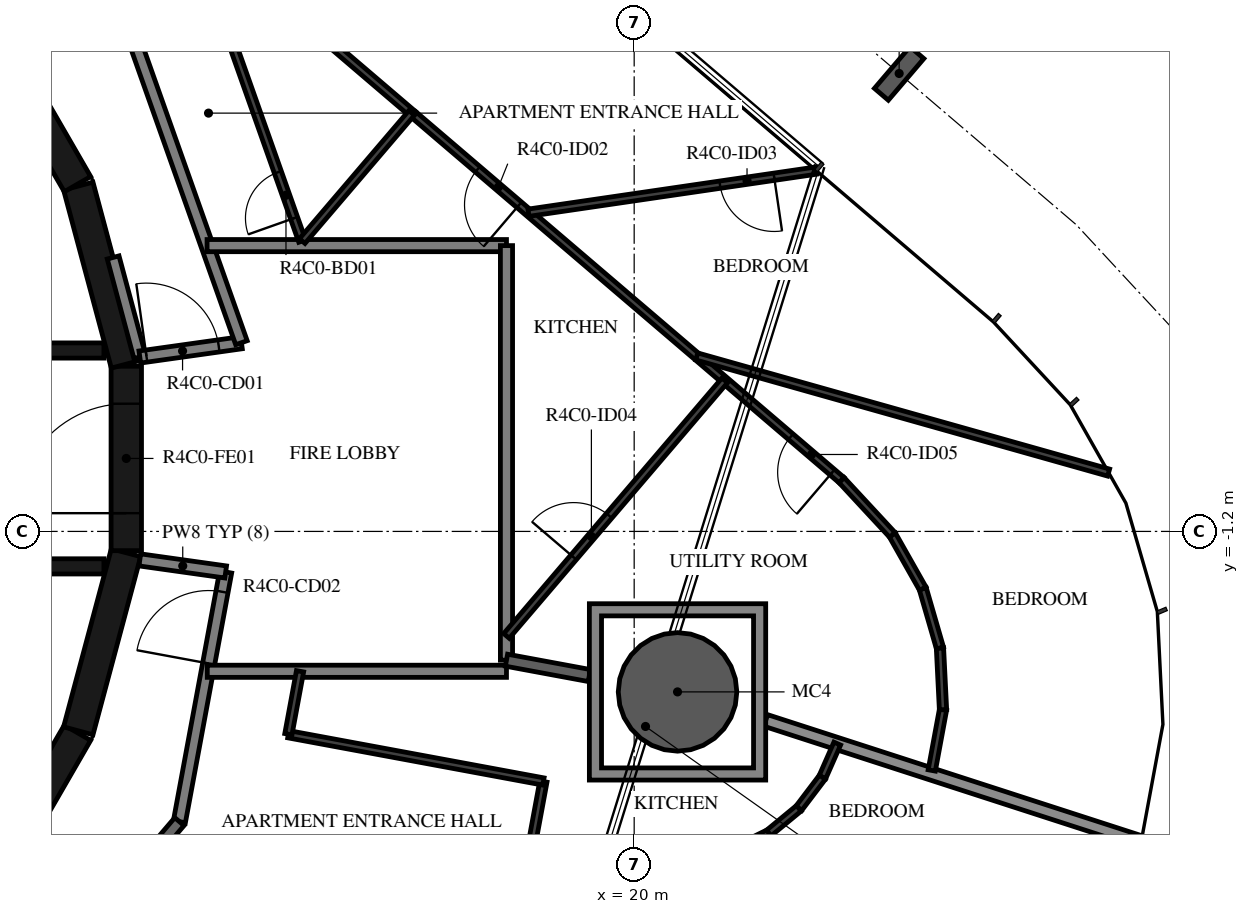
"""IFC4 building model, lengths in metres.
Left out: names, types, materials, properties, quantities, classifications, styles, units other than length and angle.
Written with IfcOpenShell. Run it as: python <this file> out.ifc"""

import sys

from ifc_helpers import new_model, si_unit, direction, frame, frame_2d, origin, origin_2d, place, context, subcontext, project, spatial, polyline, rectangle, hollow_circle, i_section, outline, extrude, element, fill, save


model = new_model("IFC4")
c1 = context("Model", 3, precision=1e-05, world=origin(), true_north=direction((0.0, 1.0)))
c2 = subcontext(c1, "Body", "Model", "MODEL_VIEW")
j1 = project(units=[si_unit("LENGTHUNIT", "METRE"), si_unit("PLANEANGLEUNIT", "RADIAN")], contexts=[c1])
p1 = place(None, origin())
s1 = spatial("IfcSite", under=j1, at=p1, CompositionType="ELEMENT")
p2 = place(p1, origin())
s2 = spatial("IfcBuilding", under=s1, at=p2, CompositionType="ELEMENT")
p3 = place(p2, frame((0.0, 0.0, 172.7)))
s3 = spatial("IfcBuildingStorey", under=s2, at=p3, CompositionType="ELEMENT", Elevation=172.7)
p4 = place(p3, frame((20.713, -3.839, -0.38), z_axis=(0.0, 0.0, 1.0), x_axis=(1.0, 0.0, 0.0)))
e1 = element("IfcColumn", 1, at=p4, inside=s3, PredefinedType="COLUMN", context=c2, shape_type="SweptSolid", body=[
    extrude(hollow_circle(Radius=0.975, WallThickness=0.045, at=origin_2d()), origin(), (0.0, 0.0, 1.0), 3.5),
])
p5 = place(p3, frame((24.358, 6.331, -0.38), z_axis=(0.0, 0.0, 1.0), x_axis=(0.76040600398, -0.649448003393, 0.0)))
e2 = element("IfcColumn", 2, at=p5, inside=s3, PredefinedType="COLUMN", context=c2, shape_type="SweptSolid", body=[
    extrude(i_section(OverallWidth=0.3, OverallDepth=0.9, WebThickness=0.019, FlangeThickness=0.035, FilletRadius=0.03, at=origin_2d()), origin(), (0.0, 0.0, 1.0), 3.5),
])
for number, where, z_axis, x_axis in (
    (3, (9.329, -7.137, 0.0), (0.0, 0.0, 1.0), (0.5, 0.866, 0.0)),
    (4, (10.858, -4.479, 0.0), (0.0, 0.0, 1.0), (0.259, 0.966, 0.0)),
):
    element("IfcWall", number, at=place(p3, frame(where, z_axis=z_axis, x_axis=x_axis)), inside=s3, PredefinedType="SHEAR", context=c2, shape_type="SweptSolid", body=[
        extrude(rectangle(XDim=3.033, YDim=0.5, at=frame_2d((1.516, 0.0))), origin(), (0.0, 0.0, 1.0), 3.12),
    ])
p6 = place(p3, frame((11.647, -1.516, 0.0), z_axis=(0.0, 0.0, 1.0), x_axis=(0.0, 1.0, 0.0)))
e5 = element("IfcWall", 5, at=p6, inside=s3, PredefinedType="SHEAR", context=c2, shape_type="SweptSolid", body=[
    extrude(rectangle(XDim=3.033, YDim=0.5, at=frame_2d((1.516, 0.0))), origin(), (0.0, 0.0, 1.0), 3.12),
])
p7 = place(p6, frame((0.616, 0.0, 0.0)))
e6 = element("IfcOpeningElement", 6, at=p7, cuts=e5, PredefinedType="OPENING", context=c2, shape_type="SweptSolid", body=[
    extrude(rectangle(XDim=1.8, YDim=2.1, at=frame_2d((0.9, 1.05))), frame((0.0, 0.26, 0.0), z_axis=(0.0, -1.0, 0.0), x_axis=(1.0, 0.0, 0.0)), (0.0, 0.0, 1.0), 0.52),
])
for number, where, z_axis, x_axis in (
    (7, (11.643, 1.55, 0.0), (0.0, 0.0, 1.0), (-0.259, 0.966, 0.0)),
    (8, (10.845, 4.51, 0.0), (0.0, 0.0, 1.0), (-0.5, 0.866, 0.0)),
):
    element("IfcWall", number, at=place(p3, frame(where, z_axis=z_axis, x_axis=x_axis)), inside=s3, PredefinedType="SHEAR", context=c2, shape_type="SweptSolid", body=[
        extrude(rectangle(XDim=3.033, YDim=0.5, at=frame_2d((1.516, 0.0))), origin(), (0.0, 0.0, 1.0), 3.12),
    ])
p8 = place(p3, frame((3.35, 1.775, 0.0), z_axis=(0.0, 0.0, 1.0), x_axis=(1.0, 0.0, 0.0)))
e9 = element("IfcWall", 9, at=p8, inside=s3, PredefinedType="SHEAR", context=c2, shape_type="SweptSolid", body=[
    extrude(rectangle(XDim=7.93, YDim=0.25, at=frame_2d((3.965, 0.0))), origin(), (0.0, 0.0, 1.0), 3.12),
])
p9 = place(p8, frame((0.35, 0.0, 0.0)))
e10 = element("IfcOpeningElement", 10, at=p9, cuts=e9, PredefinedType="OPENING", context=c2, shape_type="SweptSolid", body=[
    extrude(rectangle(XDim=1.2, YDim=2.4, at=frame_2d((0.6, 1.2))), frame((0.0, 0.135, 0.0), z_axis=(0.0, -1.0, 0.0), x_axis=(1.0, 0.0, 0.0)), (0.0, 0.0, 1.0), 0.27),
])
p10 = place(p8, frame((2.5, 0.0, 0.0)))
e11 = element("IfcOpeningElement", 11, at=p10, cuts=e9, PredefinedType="OPENING", context=c2, shape_type="SweptSolid", body=[
    extrude(rectangle(XDim=1.2, YDim=2.4, at=frame_2d((0.6, 1.2))), frame((0.0, 0.135, 0.0), z_axis=(0.0, -1.0, 0.0), x_axis=(1.0, 0.0, 0.0)), (0.0, 0.0, 1.0), 0.27),
])
p11 = place(p8, frame((4.8, 0.0, 0.0)))
e12 = element("IfcOpeningElement", 12, at=p11, cuts=e9, PredefinedType="OPENING", context=c2, shape_type="SweptSolid", body=[
    extrude(rectangle(XDim=0.9, YDim=2.1, at=frame_2d((0.45, 1.05))), frame((0.0, 0.135, 0.0), z_axis=(0.0, -1.0, 0.0), x_axis=(1.0, 0.0, 0.0)), (0.0, 0.0, 1.0), 0.27),
])
p12 = place(p3, frame((3.35, -1.775, 0.0), z_axis=(0.0, 0.0, 1.0), x_axis=(1.0, 0.0, 0.0)))
e13 = element("IfcWall", 13, at=p12, inside=s3, PredefinedType="SHEAR", context=c2, shape_type="SweptSolid", body=[
    extrude(rectangle(XDim=7.93, YDim=0.25, at=frame_2d((3.965, 0.0))), origin(), (0.0, 0.0, 1.0), 3.12),
])
p13 = place(p12, frame((0.4, 0.0, 0.0)))
e14 = element("IfcOpeningElement", 14, at=p13, cuts=e13, PredefinedType="OPENING", context=c2, shape_type="SweptSolid", body=[
    extrude(rectangle(XDim=1.1, YDim=2.4, at=frame_2d((0.55, 1.2))), frame((0.0, 0.135, 0.0), z_axis=(0.0, -1.0, 0.0), x_axis=(1.0, 0.0, 0.0)), (0.0, 0.0, 1.0), 0.27),
])
p14 = place(p12, frame((2.55, 0.0, 0.0)))
e15 = element("IfcOpeningElement", 15, at=p14, cuts=e13, PredefinedType="OPENING", context=c2, shape_type="SweptSolid", body=[
    extrude(rectangle(XDim=1.1, YDim=2.4, at=frame_2d((0.55, 1.2))), frame((0.0, 0.135, 0.0), z_axis=(0.0, -1.0, 0.0), x_axis=(1.0, 0.0, 0.0)), (0.0, 0.0, 1.0), 0.27),
])
p15 = place(p12, frame((4.7, 0.0, 0.0)))
e16 = element("IfcOpeningElement", 16, at=p15, cuts=e13, PredefinedType="OPENING", context=c2, shape_type="SweptSolid", body=[
    extrude(rectangle(XDim=1.1, YDim=2.4, at=frame_2d((0.55, 1.2))), frame((0.0, 0.135, 0.0), z_axis=(0.0, -1.0, 0.0), x_axis=(1.0, 0.0, 0.0)), (0.0, 0.0, 1.0), 0.27),
])
p16 = place(p3, frame((11.87, 1.668, 0.0), z_axis=(0.0, 0.0, 1.0), x_axis=(-0.258836880648, 0.965921047093, 0.0)))
e17 = element("IfcWall", 17, at=p16, inside=s3, PredefinedType="STANDARD", context=c2, shape_type="SweptSolid", body=[
    extrude(rectangle(XDim=1.695, YDim=0.2, at=frame_2d((0.848, 0.0))), origin(), (0.0, 0.0, 1.0), 3.12),
])
p17 = place(p3, frame((11.87, 1.668, 0.0), z_axis=(0.0, 0.0, 1.0), x_axis=(0.990270910415, 0.139152879904, 0.0)))
e18 = element("IfcWall", 18, at=p17, inside=s3, PredefinedType="STANDARD", context=c2, shape_type="SweptSolid", body=[
    extrude(rectangle(XDim=1.688, YDim=0.2, at=frame_2d((0.844, 0.0))), origin(), (0.0, 0.0, 1.0), 3.12),
])
p18 = place(p17, frame((0.11, 0.0, 0.0)))
e19 = element("IfcOpeningElement", 19, at=p18, cuts=e18, PredefinedType="OPENING", context=c2, shape_type="SweptSolid", body=[
    extrude(rectangle(XDim=1.2, YDim=2.1, at=frame_2d((0.6, 1.05))), frame((0.0, 0.11, 0.0), z_axis=(0.0, -1.0, 0.0), x_axis=(1.0, 0.0, 0.0)), (0.0, 0.0, 1.0), 0.22),
])
p19 = place(p3, frame((13.542, 1.903, 0.0), z_axis=(0.0, 0.0, 1.0), x_axis=(-0.333808508206, 0.942640907159, 0.0)))
e20 = element("IfcWall", 20, at=p19, inside=s3, PredefinedType="STANDARD", context=c2, shape_type="SweptSolid", body=[
    extrude(rectangle(XDim=6.317, YDim=0.2, at=frame_2d((3.158, 0.0))), origin(), (0.0, 0.0, 1.0), 3.12),
])
p20 = place(p3, frame((12.521, -5.972, 0.0), z_axis=(0.0, 0.0, 1.0), x_axis=(0.182244189886, 0.983253301674, 0.0)))
e21 = element("IfcWall", 21, at=p20, inside=s3, PredefinedType="STANDARD", context=c2, shape_type="SweptSolid", body=[
    extrude(rectangle(XDim=4.176, YDim=0.2, at=frame_2d((2.088, 0.0))), origin(), (0.0, 0.0, 1.0), 3.12),
])
p21 = place(p20, frame((2.645, 0.0, 0.0)))
e22 = element("IfcOpeningElement", 22, at=p21, cuts=e21, PredefinedType="OPENING", context=c2, shape_type="SweptSolid", body=[
    extrude(rectangle(XDim=1.2, YDim=2.1, at=frame_2d((0.6, 1.05))), frame((0.0, 0.11, 0.0), z_axis=(0.0, -1.0, 0.0), x_axis=(1.0, 0.0, 0.0)), (0.0, 0.0, 1.0), 0.22),
])
p22 = place(p3, frame((13.282, -1.867, 0.0), z_axis=(0.0, 0.0, 1.0), x_axis=(-0.990265430288, 0.139191873241, 0.0)))
e23 = element("IfcWall", 23, at=p22, inside=s3, PredefinedType="STANDARD", context=c2, shape_type="SweptSolid", body=[
    extrude(rectangle(XDim=1.426, YDim=0.2, at=frame_2d((0.713, 0.0))), origin(), (0.0, 0.0, 1.0), 3.12),
])
p23 = place(p3, frame((7.858, -11.433, 0.0), z_axis=(0.0, 0.0, 1.0), x_axis=(0.649440801937, 0.760412154545, 0.0)))
e24 = element("IfcWall", 24, at=p23, inside=s3, PredefinedType="STANDARD", context=c2, shape_type="SweptSolid", body=[
    extrude(rectangle(XDim=7.181, YDim=0.2, at=frame_2d((3.59, 0.0))), origin(), (0.0, 0.0, 1.0), 3.12),
])
p24 = place(p3, frame((17.9, 3.5, 0.0), z_axis=(0.0, 0.0, 1.0), x_axis=(-1.0, 0.0, 0.0)))
e25 = element("IfcWall", 25, at=p24, inside=s3, PredefinedType="STANDARD", context=c2, shape_type="SweptSolid", body=[
    extrude(rectangle(XDim=4.924, YDim=0.2, at=frame_2d((2.462, 0.0))), origin(), (0.0, 0.0, 1.0), 3.12),
])
p25 = place(p3, frame((17.9, -3.318, 0.0), z_axis=(0.0, 0.0, 1.0), x_axis=(0.0, 1.0, 0.0)))
e26 = element("IfcWall", 26, at=p25, inside=s3, PredefinedType="STANDARD", context=c2, shape_type="SweptSolid", body=[
    extrude(rectangle(XDim=6.818, YDim=0.2, at=frame_2d((3.409, 0.0))), origin(), (0.0, 0.0, 1.0), 3.12),
])
p26 = place(p3, frame((12.979, -3.5, 0.0), z_axis=(0.0, 0.0, 1.0), x_axis=(1.0, 0.0, 0.0)))
e27 = element("IfcWall", 27, at=p26, inside=s3, PredefinedType="STANDARD", context=c2, shape_type="SweptSolid", body=[
    extrude(rectangle(XDim=4.92, YDim=0.2, at=frame_2d((2.46, 0.0))), origin(), (0.0, 0.0, 1.0), 3.12),
])
p27 = place(p3, frame((22.163, -4.308, 0.0), z_axis=(0.0, 0.0, 1.0), x_axis=(0.951422718769, -0.307887658426, 0.0)))
e28 = element("IfcWall", 28, at=p27, inside=s3, PredefinedType="STANDARD", context=c2, shape_type="SweptSolid", body=[
    extrude(rectangle(XDim=6.464, YDim=0.2, at=frame_2d((3.232, 0.0))), origin(), (0.0, 0.0, 1.0), 2.73),
])
p28 = place(p3, frame((17.9, -3.318, 0.0), z_axis=(0.0, 0.0, 1.0), x_axis=(0.983252800712, -0.182246892682, 0.0)))
e29 = element("IfcWall", 29, at=p28, inside=s3, PredefinedType="STANDARD", context=c2, shape_type="SweptSolid", body=[
    extrude(rectangle(XDim=1.386, YDim=0.2, at=frame_2d((0.693, 0.0))), origin(), (0.0, 0.0, 1.0), 3.12),
])
p29 = place(p3, frame((14.541, 3.575, 0.0), z_axis=(0.0, 0.0, 1.0), x_axis=(-0.333799280318, 0.942644174893, 0.0)))
e30 = element("IfcWall", 30, at=p29, inside=s3, PredefinedType="PARTITIONING", context=c2, shape_type="SweptSolid", body=[
    extrude(rectangle(XDim=5.477, YDim=0.12, at=frame_2d((2.738, 0.0))), origin(), (0.0, 0.0, 1.0), 3.12),
])
p30 = place(p29, frame((0.4, 0.0, 0.0)))
e31 = element("IfcOpeningElement", 31, at=p30, cuts=e30, PredefinedType="OPENING", context=c2, shape_type="SweptSolid", body=[
    extrude(rectangle(XDim=0.8, YDim=2.1, at=frame_2d((0.4, 1.05))), frame((0.0, 0.07, 0.0), z_axis=(0.0, -1.0, 0.0), x_axis=(1.0, 0.0, 0.0)), (0.0, 0.0, 1.0), 0.14),
])
p31 = place(p3, frame((12.734, 8.762, 0.0), z_axis=(0.0, 0.0, 1.0), x_axis=(0.760390484255, -0.649466174219, 0.0)))
e32 = element("IfcWall", 32, at=p31, inside=s3, PredefinedType="PARTITIONING", context=c2, shape_type="SweptSolid", body=[
    extrude(rectangle(XDim=4.783, YDim=0.12, at=frame_2d((2.391, 0.0))), origin(), (0.0, 0.0, 1.0), 3.12),
])
p32 = place(p3, frame((23.411, -0.357, 0.0), z_axis=(0.0, 0.0, 1.0), x_axis=(-0.76041871148, 0.649433124525, 0.0)))
e33 = element("IfcWall", 33, at=p32, inside=s3, PredefinedType="PARTITIONING", context=c2, shape_type="SweptSolid", body=[
    extrude(rectangle(XDim=9.259, YDim=0.12, at=frame_2d((4.629, 0.0))), origin(), (0.0, 0.0, 1.0), 3.12),
])
p33 = place(p32, frame((6.972, 0.0, 0.0)))
e34 = element("IfcOpeningElement", 34, at=p33, cuts=e33, PredefinedType="OPENING", context=c2, shape_type="SweptSolid", body=[
    extrude(rectangle(XDim=0.9, YDim=2.1, at=frame_2d((0.45, 1.05))), frame((0.0, 0.07, 0.0), z_axis=(0.0, -1.0, 0.0), x_axis=(1.0, 0.0, 0.0)), (0.0, 0.0, 1.0), 0.14),
])
p34 = place(p32, frame((0.2, 0.0, 0.0)))
e35 = element("IfcOpeningElement", 35, at=p34, cuts=e33, PredefinedType="OPENING", context=c2, shape_type="SweptSolid", body=[
    extrude(rectangle(XDim=0.9, YDim=2.1, at=frame_2d((0.45, 1.05))), frame((0.0, 0.07, 0.0), z_axis=(0.0, -1.0, 0.0), x_axis=(1.0, 0.0, 0.0)), (0.0, 0.0, 1.0), 0.14),
])
p35 = place(p3, frame((16.341, 5.682, 0.0), z_axis=(0.0, 0.0, 1.0), x_axis=(-0.64946993237, -0.76038727432, 0.0)))
e36 = element("IfcWall", 36, at=p35, inside=s3, PredefinedType="PARTITIONING", context=c2, shape_type="SweptSolid", body=[
    extrude(rectangle(XDim=2.771, YDim=0.12, at=frame_2d((1.386, 0.0))), origin(), (0.0, 0.0, 1.0), 3.12),
])
p36 = place(p3, frame((17.9, -2.918, 0.0), z_axis=(0.0, 0.0, 1.0), x_axis=(0.649469887983, 0.760387312232, 0.0)))
e37 = element("IfcWall", 37, at=p36, inside=s3, PredefinedType="PARTITIONING", context=c2, shape_type="SweptSolid", body=[
    extrude(rectangle(XDim=5.527, YDim=0.12, at=frame_2d((2.763, 0.0))), origin(), (0.0, 0.0, 1.0), 3.12),
])
p37 = place(p36, frame((1.7, 0.0, 0.0)))
e38 = element("IfcOpeningElement", 38, at=p37, cuts=e37, PredefinedType="OPENING", context=c2, shape_type="SweptSolid", body=[
    extrude(rectangle(XDim=0.9, YDim=2.1, at=frame_2d((0.45, 1.05))), frame((0.0, 0.07, 0.0), z_axis=(0.0, -1.0, 0.0), x_axis=(1.0, 0.0, 0.0)), (0.0, 0.0, 1.0), 0.14),
])
p38 = place(p3, frame((22.994, 4.734, 0.0), z_axis=(0.0, 0.0, 1.0), x_axis=(-0.989449286977, -0.144879634529, 0.0)))
e39 = element("IfcWall", 39, at=p38, inside=s3, PredefinedType="PARTITIONING", context=c2, shape_type="SweptSolid", body=[
    extrude(rectangle(XDim=4.782, YDim=0.12, at=frame_2d((2.391, 0.0))), origin(), (0.0, 0.0, 1.0), 3.12),
])
p39 = place(p38, frame((0.7, 0.0, 0.0)))
e40 = element("IfcOpeningElement", 40, at=p39, cuts=e39, PredefinedType="OPENING", context=c2, shape_type="SweptSolid", body=[
    extrude(rectangle(XDim=0.9, YDim=2.1, at=frame_2d((0.45, 1.05))), frame((0.0, 0.07, 0.0), z_axis=(0.0, -1.0, 0.0), x_axis=(1.0, 0.0, 0.0)), (0.0, 0.0, 1.0), 0.14),
])
p40 = place(p3, frame((21.029, 1.677, 0.0), z_axis=(0.0, 0.0, 1.0), x_axis=(0.962458274539, -0.271429677396, 0.0)))
e41 = element("IfcWall", 41, at=p40, inside=s3, PredefinedType="PARTITIONING", context=c2, shape_type="SweptSolid", body=[
    extrude(rectangle(XDim=7.037, YDim=0.12, at=frame_2d((3.519, 0.0))), origin(), (0.0, 0.0, 1.0), 3.12),
])
for number, where, z_axis, x_axis in (
    (42, (24.894, -5.131, 0.0), (0.0, 0.0, 1.0), (0.182, 0.983, 0.0)),
    (43, (25.079, -4.132, 0.0), (0.0, 0.0, 1.0), (-0.049, 0.999, 0.0)),
):
    element("IfcWall", number, at=place(p3, frame(where, z_axis=z_axis, x_axis=x_axis)), inside=s3, PredefinedType="PARTITIONING", context=c2, shape_type="SweptSolid", body=[
        extrude(rectangle(XDim=1.016, YDim=0.12, at=frame_2d((0.508, 0.0))), origin(), (0.0, 0.0, 1.0), 3.12),
    ])
for number, where, z_axis, x_axis in (
    (44, (25.029, -3.117, 0.0), (0.0, 0.0, 1.0), (-0.279, 0.96, 0.0)),
    (45, (24.746, -2.141, 0.0), (0.0, 0.0, 1.0), (-0.492, 0.87, 0.0)),
):
    element("IfcWall", number, at=place(p3, frame(where, z_axis=z_axis, x_axis=x_axis)), inside=s3, PredefinedType="PARTITIONING", context=c2, shape_type="SweptSolid", body=[
        extrude(rectangle(XDim=1.016, YDim=0.12, at=frame_2d((0.508, 0.0))), origin(), (0.0, 0.0, 1.0), 3.12),
    ])
p41 = place(p3, frame((24.246, -1.257, 0.0), z_axis=(0.0, 0.0, 1.0), x_axis=(-0.679840361176, 0.733360132074, 0.0)))
e46 = element("IfcWall", 46, at=p41, inside=s3, PredefinedType="PARTITIONING", context=c2, shape_type="SweptSolid", body=[
    extrude(rectangle(XDim=1.227, YDim=0.12, at=frame_2d((0.614, 0.0))), origin(), (0.0, 0.0, 1.0), 3.12),
])
p42 = place(p3, frame((18.055, -7.75, 0.0), z_axis=(0.0, 0.0, 1.0), x_axis=(0.18225497314, 0.983251302957, 0.0)))
e47 = element("IfcWall", 47, at=p42, inside=s3, PredefinedType="PARTITIONING", context=c2, shape_type="SweptSolid", body=[
    extrude(rectangle(XDim=2.479, YDim=0.12, at=frame_2d((1.24, 0.0))), origin(), (0.0, 0.0, 1.0), 3.12),
])
p43 = place(p42, frame((0.4, 0.0, 0.0)))
e48 = element("IfcOpeningElement", 48, at=p43, cuts=e47, PredefinedType="OPENING", context=c2, shape_type="SweptSolid", body=[
    extrude(rectangle(XDim=0.9, YDim=2.1, at=frame_2d((0.45, 1.05))), frame((0.0, 0.07, 0.0), z_axis=(0.0, -1.0, 0.0), x_axis=(1.0, 0.0, 0.0)), (0.0, 0.0, 1.0), 0.14),
])
p44 = place(p3, frame((18.507, -5.312, 0.0), z_axis=(0.0, 0.0, 1.0), x_axis=(-0.983254286603, 0.182238875868, 0.0)))
e49 = element("IfcWall", 49, at=p44, inside=s3, PredefinedType="PARTITIONING", context=c2, shape_type="SweptSolid", body=[
    extrude(rectangle(XDim=4.266, YDim=0.12, at=frame_2d((2.133, 0.0))), origin(), (0.0, 0.0, 1.0), 3.12),
])
p45 = place(p3, frame((14.313, -4.535, 0.0), z_axis=(0.0, 0.0, 1.0), x_axis=(0.182271946033, 0.983248156718, 0.0)))
e50 = element("IfcWall", 50, at=p45, inside=s3, PredefinedType="PARTITIONING", context=c2, shape_type="SweptSolid", body=[
    extrude(rectangle(XDim=1.053, YDim=0.12, at=frame_2d((0.526, 0.0))), origin(), (0.0, 0.0, 1.0), 3.12),
])
p46 = place(p3, frame((23.34, -4.689, 0.0), z_axis=(0.0, 0.0, 1.0), x_axis=(-0.404077449371, -0.914724775498, 0.0)))
e51 = element("IfcWall", 51, at=p46, inside=s3, PredefinedType="PARTITIONING", context=c2, shape_type="SweptSolid", body=[
    extrude(rectangle(XDim=0.605, YDim=0.12, at=frame_2d((0.302, 0.0))), origin(), (0.0, 0.0, 1.0), 3.12),
])
for number, where, z_axis, x_axis in (
    (52, (23.095, -5.242, 0.0), (0.0, 0.0, 1.0), (-0.604, -0.797, 0.0)),
    (53, (22.708, -5.754, 0.0), (0.0, 0.0, 1.0), (-0.772, -0.636, 0.0)),
):
    element("IfcWall", number, at=place(p3, frame(where, z_axis=z_axis, x_axis=x_axis)), inside=s3, PredefinedType="PARTITIONING", context=c2, shape_type="SweptSolid", body=[
        extrude(rectangle(XDim=0.642, YDim=0.12, at=frame_2d((0.321, 0.0))), origin(), (0.0, 0.0, 1.0), 3.12),
    ])
p47 = place(p3, frame((22.212, -6.162, 0.0), z_axis=(0.0, 0.0, 1.0), x_axis=(-0.897448694974, -0.441118850072, 0.0)))
e54 = element("IfcWall", 54, at=p47, inside=s3, PredefinedType="PARTITIONING", context=c2, shape_type="SweptSolid", body=[
    extrude(rectangle(XDim=0.947, YDim=0.12, at=frame_2d((0.474, 0.0))), origin(), (0.0, 0.0, 1.0), 3.12),
])
p48 = place(p3, origin())
e55 = element("IfcWall", 55, at=p48, inside=s3, PredefinedType="STANDARD", context=c2, shape_type="SweptSolid", body=[
    extrude(outline(polyline([(22.163, -2.389), (22.163, -5.289), (19.263, -5.289), (19.263, -2.389), (22.163, -2.389)]), holes=[polyline([(19.463, -5.089), (21.963, -5.089), (21.963, -2.589), (19.463, -2.589), (19.463, -5.089)])]), origin(), (0.0, 0.0, 1.0), 3.12),
])
p49 = place(p7, origin())
e56 = element("IfcDoor", 56, at=p49, inside=s3, OperationType="DOUBLE_DOOR_SINGLE_SWING", PredefinedType="DOOR", context=c2, shape_type="SweptSolid", body=[
    extrude(rectangle(XDim=1.8, YDim=2.1, at=frame_2d((0.9, 1.05))), frame((0.0, 0.025, 0.0), z_axis=(0.0, -1.0, 0.0), x_axis=(1.0, 0.0, 0.0)), (0.0, 0.0, 1.0), 0.05),
])
fill(e6, e56)
p50 = place(p30, origin())
e57 = element("IfcDoor", 57, at=p50, inside=s3, OperationType="SINGLE_SWING_LEFT", PredefinedType="DOOR", context=c2, shape_type="SweptSolid", body=[
    extrude(rectangle(XDim=0.8, YDim=2.1, at=frame_2d((0.4, 1.05))), frame((0.0, 0.025, 0.0), z_axis=(0.0, -1.0, 0.0), x_axis=(1.0, 0.0, 0.0)), (0.0, 0.0, 1.0), 0.05),
])
fill(e31, e57)
p51 = place(p33, origin())
e58 = element("IfcDoor", 58, at=p51, inside=s3, OperationType="SINGLE_SWING_RIGHT", PredefinedType="DOOR", context=c2, shape_type="SweptSolid", body=[
    extrude(rectangle(XDim=0.9, YDim=2.1, at=frame_2d((0.45, 1.05))), frame((0.0, 0.025, 0.0), z_axis=(0.0, -1.0, 0.0), x_axis=(1.0, 0.0, 0.0)), (0.0, 0.0, 1.0), 0.05),
])
fill(e34, e58)
p52 = place(p39, origin())
e59 = element("IfcDoor", 59, at=p52, inside=s3, OperationType="SINGLE_SWING_LEFT", PredefinedType="DOOR", context=c2, shape_type="SweptSolid", body=[
    extrude(rectangle(XDim=0.9, YDim=2.1, at=frame_2d((0.45, 1.05))), frame((0.0, 0.025, 0.0), z_axis=(0.0, -1.0, 0.0), x_axis=(1.0, 0.0, 0.0)), (0.0, 0.0, 1.0), 0.05),
])
fill(e40, e59)
p53 = place(p37, origin())
e60 = element("IfcDoor", 60, at=p53, inside=s3, OperationType="SINGLE_SWING_LEFT", PredefinedType="DOOR", context=c2, shape_type="SweptSolid", body=[
    extrude(rectangle(XDim=0.9, YDim=2.1, at=frame_2d((0.45, 1.05))), frame((0.0, 0.025, 0.0), z_axis=(0.0, -1.0, 0.0), x_axis=(1.0, 0.0, 0.0)), (0.0, 0.0, 1.0), 0.05),
])
fill(e38, e60)
p54 = place(p34, origin())
e61 = element("IfcDoor", 61, at=p54, inside=s3, OperationType="SINGLE_SWING_LEFT", PredefinedType="DOOR", context=c2, shape_type="SweptSolid", body=[
    extrude(rectangle(XDim=0.9, YDim=2.1, at=frame_2d((0.45, 1.05))), frame((0.0, 0.025, 0.0), z_axis=(0.0, -1.0, 0.0), x_axis=(1.0, 0.0, 0.0)), (0.0, 0.0, 1.0), 0.05),
])
fill(e35, e61)
p55 = place(p18, origin())
e62 = element("IfcDoor", 62, at=p55, inside=s3, OperationType="DOUBLE_DOOR_SINGLE_SWING", PredefinedType="DOOR", context=c2, shape_type="SweptSolid", body=[
    extrude(rectangle(XDim=1.2, YDim=2.1, at=frame_2d((0.6, 1.05))), frame((0.0, 0.025, 0.0), z_axis=(0.0, -1.0, 0.0), x_axis=(1.0, 0.0, 0.0)), (0.0, 0.0, 1.0), 0.05),
])
fill(e19, e62)
p56 = place(p21, origin())
e63 = element("IfcDoor", 63, at=p56, inside=s3, OperationType="DOUBLE_DOOR_SINGLE_SWING", PredefinedType="DOOR", context=c2, shape_type="SweptSolid", body=[
    extrude(rectangle(XDim=1.2, YDim=2.1, at=frame_2d((0.6, 1.05))), frame((0.0, 0.025, 0.0), z_axis=(0.0, -1.0, 0.0), x_axis=(1.0, 0.0, 0.0)), (0.0, 0.0, 1.0), 0.05),
])
fill(e22, e63)
save(model, sys.argv[1])
